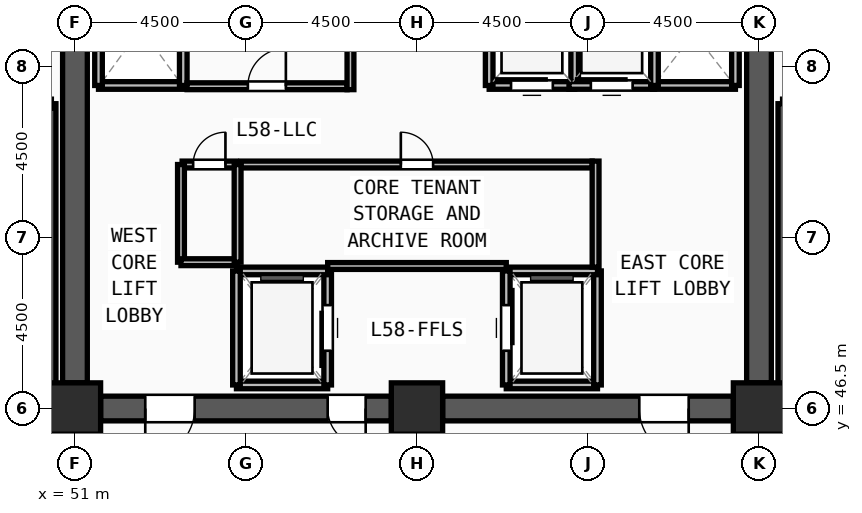
"""IFC4 building model, lengths in metres.
Left out: names, types, materials, properties, quantities, classifications, styles, units other than length and angle.
Written with IfcOpenShell. Run it as: python <this file> out.ifc"""

import sys

from ifc_helpers import new_model, si_unit, direction, frame, frame_2d, origin, origin_2d, place, context, subcontext, project, spatial, rectangle, extrude, source, transform, mapped, element, fill, save


model = new_model("IFC4")
c1 = context("Model", 3, precision=1e-05, world=origin(), true_north=direction((0.0, 1.0)))
c2 = subcontext(c1, "Body", "Model", "MODEL_VIEW")
j1 = project(units=[si_unit("LENGTHUNIT", "METRE"), si_unit("PLANEANGLEUNIT", "RADIAN")], contexts=[c1])
p1 = place(None, origin())
s1 = spatial("IfcSite", under=j1, at=p1, CompositionType="ELEMENT")
p2 = place(p1, origin())
s2 = spatial("IfcBuilding", under=s1, at=p2, CompositionType="ELEMENT")
p3 = place(p2, frame((0.0, 0.0, 224.25)))
s3 = spatial("IfcBuildingStorey", under=s2, at=p3, CompositionType="ELEMENT", Elevation=224.25)
m1 = source(origin(), c2, "Body", "SweptSolid", [
    extrude(rectangle(XDim=1.35, YDim=1.35, at=origin_2d()), origin(), (0.0, 0.0, 1.0), 3.75),
])
for number, where, z_axis, x_axis in (
    (1, (51.0, 46.5, 0.0), (0.0, 0.0, 1.0), (1.0, 0.0, 0.0)),
    (2, (60.0, 46.5, 0.0), (0.0, 0.0, 1.0), (1.0, 0.0, 0.0)),
    (3, (69.0, 46.5, 0.0), (0.0, 0.0, 1.0), (1.0, 0.0, 0.0)),
):
    element("IfcColumn", number, at=place(p3, frame(where, z_axis=z_axis, x_axis=x_axis)), inside=s3, PredefinedType="COLUMN", context=c2, shape_type="MappedRepresentation", body=[
        mapped(m1, transform((0.0, 0.0, 0.0), x_axis=(1.0, 0.0, 0.0), y_axis=(0.0, 1.0, 0.0), z_axis=(0.0, 0.0, 1.0), scale=1.0)),
    ])
p4 = place(p3, frame((69.0, 60.825, 0.0), z_axis=(0.0, 0.0, 1.0), x_axis=(0.0, -1.0, 0.0)))
e4 = element("IfcWall", 4, at=p4, inside=s3, PredefinedType="SHEAR", context=c2, shape_type="SweptSolid", body=[
    extrude(rectangle(XDim=13.65, YDim=0.65, at=frame_2d((6.825, 0.0))), origin(), (0.0, 0.0, 1.0), 3.57),
])
m2 = source(origin(), c2, "Body", "SweptSolid", [
    extrude(rectangle(XDim=1.2, YDim=2.2, at=frame_2d((0.6, 1.1))), frame((0.0, 0.335, 0.0), z_axis=(0.0, -1.0, 0.0), x_axis=(1.0, 0.0, 0.0)), (0.0, 0.0, 1.0), 0.67),
])
p5 = place(p4, frame((1.275, 0.0, 0.0)))
e5 = element("IfcOpeningElement", 5, at=p5, cuts=e4, PredefinedType="OPENING", context=c2, shape_type="MappedRepresentation", body=[
    mapped(m2, transform((0.0, 0.0, 0.0), x_axis=(1.0, 0.0, 0.0), y_axis=(0.0, 1.0, 0.0), z_axis=(0.0, 0.0, 1.0), scale=1.0)),
])
p6 = place(p3, frame((68.325, 46.5, 0.0), z_axis=(0.0, 0.0, 1.0), x_axis=(-1.0, 0.0, 0.0)))
e6 = element("IfcWall", 6, at=p6, inside=s3, PredefinedType="SHEAR", context=c2, shape_type="SweptSolid", body=[
    extrude(rectangle(XDim=7.65, YDim=0.65, at=frame_2d((3.825, 0.0))), origin(), (0.0, 0.0, 1.0), 3.57),
])
m3 = source(origin(), c2, "Body", "SweptSolid", [
    extrude(rectangle(XDim=1.3, YDim=2.2, at=frame_2d((0.65, 1.1))), frame((0.0, 0.335, 0.0), z_axis=(0.0, -1.0, 0.0), x_axis=(1.0, 0.0, 0.0)), (0.0, 0.0, 1.0), 0.67),
])
p7 = place(p6, frame((1.175, 0.0, 0.0)))
e7 = element("IfcOpeningElement", 7, at=p7, cuts=e6, PredefinedType="OPENING", context=c2, shape_type="MappedRepresentation", body=[
    mapped(m3, transform((0.0, 0.0, 0.0), x_axis=(1.0, 0.0, 0.0), y_axis=(0.0, 1.0, 0.0), z_axis=(0.0, 0.0, 1.0), scale=1.0)),
])
p8 = place(p3, frame((59.325, 46.5, 0.0), z_axis=(0.0, 0.0, 1.0), x_axis=(-1.0, 0.0, 0.0)))
e8 = element("IfcWall", 8, at=p8, inside=s3, PredefinedType="SHEAR", context=c2, shape_type="SweptSolid", body=[
    extrude(rectangle(XDim=7.65, YDim=0.65, at=frame_2d((3.825, 0.0))), origin(), (0.0, 0.0, 1.0), 3.57),
])
p9 = place(p8, frame((5.175, 0.0, 0.0)))
e9 = element("IfcOpeningElement", 9, at=p9, cuts=e8, PredefinedType="OPENING", context=c2, shape_type="MappedRepresentation", body=[
    mapped(m3, transform((0.0, 0.0, 0.0), x_axis=(1.0, 0.0, 0.0), y_axis=(0.0, 1.0, 0.0), z_axis=(0.0, 0.0, 1.0), scale=1.0)),
])
m4 = source(origin(), c2, "Body", "SweptSolid", [
    extrude(rectangle(XDim=1.0, YDim=2.2, at=frame_2d((0.5, 1.1))), frame((0.0, 0.335, 0.0), z_axis=(0.0, -1.0, 0.0), x_axis=(1.0, 0.0, 0.0)), (0.0, 0.0, 1.0), 0.67),
])
p10 = place(p8, frame((0.675, 0.0, 0.0)))
e10 = element("IfcOpeningElement", 10, at=p10, cuts=e8, PredefinedType="OPENING", context=c2, shape_type="MappedRepresentation", body=[
    mapped(m4, transform((0.0, 0.0, 0.0), x_axis=(1.0, 0.0, 0.0), y_axis=(0.0, 1.0, 0.0), z_axis=(0.0, 0.0, 1.0), scale=1.0)),
])
p11 = place(p3, frame((51.0, 47.175, 0.0), z_axis=(0.0, 0.0, 1.0), x_axis=(0.0, 1.0, 0.0)))
e11 = element("IfcWall", 11, at=p11, inside=s3, PredefinedType="SHEAR", context=c2, shape_type="SweptSolid", body=[
    extrude(rectangle(XDim=13.65, YDim=0.65, at=frame_2d((6.825, 0.0))), origin(), (0.0, 0.0, 1.0), 3.57),
])
for number, where, z_axis, x_axis in (
    (12, (50.38, 46.7, 0.0), (0.0, 0.0, 1.0), (0.0, 1.0, 0.0)),
    (13, (69.62, 54.52, 0.0), (0.0, 0.0, 1.0), (0.0, -1.0, 0.0)),
):
    element("IfcWall", number, at=place(p3, frame(where, z_axis=z_axis, x_axis=x_axis)), inside=s3, PredefinedType="SOLIDWALL", context=c2, shape_type="SweptSolid", body=[
        extrude(rectangle(XDim=7.82, YDim=0.24, at=frame_2d((3.91, 0.0))), origin(), (0.0, 0.0, 1.0), 3.57),
    ])
p12 = place(p3, frame((55.25, 47.12, 0.0), z_axis=(0.0, 0.0, 1.0), x_axis=(1.0, 0.0, 0.0)))
e14 = element("IfcWall", 14, at=p12, inside=s3, PredefinedType="SOLIDWALL", context=c2, shape_type="SweptSolid", body=[
    extrude(rectangle(XDim=2.4, YDim=0.2, at=frame_2d((1.2, 0.0))), origin(), (0.0, 0.0, 1.0), 3.57),
])
p13 = place(p3, frame((57.65, 47.12, 0.0), z_axis=(0.0, 0.0, 1.0), x_axis=(0.0, 1.0, 0.0)))
e15 = element("IfcWall", 15, at=p13, inside=s3, PredefinedType="SOLIDWALL", context=c2, shape_type="SweptSolid", body=[
    extrude(rectangle(XDim=3.0, YDim=0.2, at=frame_2d((1.5, 0.0))), origin(), (0.0, 0.0, 1.0), 3.57),
])
m5 = source(origin(), c2, "Body", "SweptSolid", [
    extrude(rectangle(XDim=1.2, YDim=2.3, at=frame_2d((0.6, 1.15))), frame((0.0, 0.11, 0.0), z_axis=(0.0, -1.0, 0.0), x_axis=(1.0, 0.0, 0.0)), (0.0, 0.0, 1.0), 0.22),
])
p14 = place(p13, frame((0.9, 0.0, 0.0)))
e16 = element("IfcOpeningElement", 16, at=p14, cuts=e15, PredefinedType="OPENING", context=c2, shape_type="MappedRepresentation", body=[
    mapped(m5, transform((0.0, 0.0, 0.0), x_axis=(1.0, 0.0, 0.0), y_axis=(0.0, 1.0, 0.0), z_axis=(0.0, 0.0, 1.0), scale=1.0)),
])
p15 = place(p3, frame((57.65, 50.12, 0.0), z_axis=(0.0, 0.0, 1.0), x_axis=(-1.0, 0.0, 0.0)))
e17 = element("IfcWall", 17, at=p15, inside=s3, PredefinedType="SOLIDWALL", context=c2, shape_type="SweptSolid", body=[
    extrude(rectangle(XDim=2.4, YDim=0.2, at=frame_2d((1.2, 0.0))), origin(), (0.0, 0.0, 1.0), 3.57),
])
p16 = place(p3, frame((55.25, 50.12, 0.0), z_axis=(0.0, 0.0, 1.0), x_axis=(0.0, -1.0, 0.0)))
e18 = element("IfcWall", 18, at=p16, inside=s3, PredefinedType="SOLIDWALL", context=c2, shape_type="SweptSolid", body=[
    extrude(rectangle(XDim=3.0, YDim=0.2, at=frame_2d((1.5, 0.0))), origin(), (0.0, 0.0, 1.0), 3.57),
])
p17 = place(p3, frame((62.35, 47.12, 0.0), z_axis=(0.0, 0.0, 1.0), x_axis=(1.0, 0.0, 0.0)))
e19 = element("IfcWall", 19, at=p17, inside=s3, PredefinedType="SOLIDWALL", context=c2, shape_type="SweptSolid", body=[
    extrude(rectangle(XDim=2.4, YDim=0.2, at=frame_2d((1.2, 0.0))), origin(), (0.0, 0.0, 1.0), 3.57),
])
p18 = place(p3, frame((64.75, 47.12, 0.0), z_axis=(0.0, 0.0, 1.0), x_axis=(0.0, 1.0, 0.0)))
e20 = element("IfcWall", 20, at=p18, inside=s3, PredefinedType="SOLIDWALL", context=c2, shape_type="SweptSolid", body=[
    extrude(rectangle(XDim=3.0, YDim=0.2, at=frame_2d((1.5, 0.0))), origin(), (0.0, 0.0, 1.0), 3.57),
])
p19 = place(p3, frame((64.75, 50.12, 0.0), z_axis=(0.0, 0.0, 1.0), x_axis=(-1.0, 0.0, 0.0)))
e21 = element("IfcWall", 21, at=p19, inside=s3, PredefinedType="SOLIDWALL", context=c2, shape_type="SweptSolid", body=[
    extrude(rectangle(XDim=2.4, YDim=0.2, at=frame_2d((1.2, 0.0))), origin(), (0.0, 0.0, 1.0), 3.57),
])
p20 = place(p3, frame((62.35, 50.12, 0.0), z_axis=(0.0, 0.0, 1.0), x_axis=(0.0, -1.0, 0.0)))
e22 = element("IfcWall", 22, at=p20, inside=s3, PredefinedType="SOLIDWALL", context=c2, shape_type="SweptSolid", body=[
    extrude(rectangle(XDim=3.0, YDim=0.2, at=frame_2d((1.5, 0.0))), origin(), (0.0, 0.0, 1.0), 3.57),
])
p21 = place(p20, frame((0.9, 0.0, 0.0)))
e23 = element("IfcOpeningElement", 23, at=p21, cuts=e22, PredefinedType="OPENING", context=c2, shape_type="MappedRepresentation", body=[
    mapped(m5, transform((0.0, 0.0, 0.0), x_axis=(1.0, 0.0, 0.0), y_axis=(0.0, 1.0, 0.0), z_axis=(0.0, 0.0, 1.0), scale=1.0)),
])
p22 = place(p3, frame((51.62, 55.0, 0.0), z_axis=(0.0, 0.0, 1.0), x_axis=(1.0, 0.0, 0.0)))
e24 = element("IfcWall", 24, at=p22, inside=s3, PredefinedType="SOLIDWALL", context=c2, shape_type="SweptSolid", body=[
    extrude(rectangle(XDim=2.23, YDim=0.2, at=frame_2d((1.115, 0.0))), origin(), (0.0, 0.0, 1.0), 3.57),
])
for number, where, z_axis, x_axis in (
    (25, (53.85, 55.0, 0.0), (0.0, 0.0, 1.0), (0.0, 1.0, 0.0)),
    (26, (51.62, 58.0, 0.0), (0.0, 0.0, 1.0), (0.0, -1.0, 0.0)),
):
    element("IfcWall", number, at=place(p3, frame(where, z_axis=z_axis, x_axis=x_axis)), inside=s3, PredefinedType="SOLIDWALL", context=c2, shape_type="SweptSolid", body=[
        extrude(rectangle(XDim=3.0, YDim=0.2, at=frame_2d((1.5, 0.0))), origin(), (0.0, 0.0, 1.0), 3.57),
    ])
p23 = place(p3, frame((66.2, 55.0, 0.0), z_axis=(0.0, 0.0, 1.0), x_axis=(1.0, 0.0, 0.0)))
e27 = element("IfcWall", 27, at=p23, inside=s3, PredefinedType="SOLIDWALL", context=c2, shape_type="SweptSolid", body=[
    extrude(rectangle(XDim=2.18, YDim=0.2, at=frame_2d((1.09, 0.0))), origin(), (0.0, 0.0, 1.0), 3.57),
])
p24 = place(p3, frame((68.38, 55.0, 0.0), z_axis=(0.0, 0.0, 1.0), x_axis=(0.0, 1.0, 0.0)))
e28 = element("IfcWall", 28, at=p24, inside=s3, PredefinedType="SOLIDWALL", context=c2, shape_type="SweptSolid", body=[
    extrude(rectangle(XDim=2.75, YDim=0.2, at=frame_2d((1.375, 0.0))), origin(), (0.0, 0.0, 1.0), 3.57),
])
p25 = place(p3, frame((61.9, 55.0, 0.0), z_axis=(0.0, 0.0, 1.0), x_axis=(1.0, 0.0, 0.0)))
e29 = element("IfcWall", 29, at=p25, inside=s3, PredefinedType="SOLIDWALL", context=c2, shape_type="SweptSolid", body=[
    extrude(rectangle(XDim=2.25, YDim=0.2, at=frame_2d((1.125, 0.0))), origin(), (0.0, 0.0, 1.0), 3.57),
])
m6 = source(origin(), c2, "Body", "SweptSolid", [
    extrude(rectangle(XDim=1.1, YDim=2.2, at=frame_2d((0.55, 1.1))), frame((0.0, 0.11, 0.0), z_axis=(0.0, -1.0, 0.0), x_axis=(1.0, 0.0, 0.0)), (0.0, 0.0, 1.0), 0.22),
])
p26 = place(p25, frame((0.575, 0.0, 0.0)))
e30 = element("IfcOpeningElement", 30, at=p26, cuts=e29, PredefinedType="OPENING", context=c2, shape_type="MappedRepresentation", body=[
    mapped(m6, transform((0.0, 0.0, 0.0), x_axis=(1.0, 0.0, 0.0), y_axis=(0.0, 1.0, 0.0), z_axis=(0.0, 0.0, 1.0), scale=1.0)),
])
for number, where, z_axis, x_axis in (
    (31, (64.15, 55.0, 0.0), (0.0, 0.0, 1.0), (0.0, 1.0, 0.0)),
    (32, (61.9, 57.6, 0.0), (0.0, 0.0, 1.0), (0.0, -1.0, 0.0)),
):
    element("IfcWall", number, at=place(p3, frame(where, z_axis=z_axis, x_axis=x_axis)), inside=s3, PredefinedType="SOLIDWALL", context=c2, shape_type="SweptSolid", body=[
        extrude(rectangle(XDim=2.6, YDim=0.2, at=frame_2d((1.3, 0.0))), origin(), (0.0, 0.0, 1.0), 3.57),
    ])
p27 = place(p3, frame((64.0, 55.0, 0.0), z_axis=(0.0, 0.0, 1.0), x_axis=(1.0, 0.0, 0.0)))
e33 = element("IfcWall", 33, at=p27, inside=s3, PredefinedType="SOLIDWALL", context=c2, shape_type="SweptSolid", body=[
    extrude(rectangle(XDim=2.25, YDim=0.2, at=frame_2d((1.125, 0.0))), origin(), (0.0, 0.0, 1.0), 3.57),
])
p28 = place(p27, frame((0.575, 0.0, 0.0)))
e34 = element("IfcOpeningElement", 34, at=p28, cuts=e33, PredefinedType="OPENING", context=c2, shape_type="MappedRepresentation", body=[
    mapped(m6, transform((0.0, 0.0, 0.0), x_axis=(1.0, 0.0, 0.0), y_axis=(0.0, 1.0, 0.0), z_axis=(0.0, 0.0, 1.0), scale=1.0)),
])
p29 = place(p3, frame((66.25, 55.0, 0.0), z_axis=(0.0, 0.0, 1.0), x_axis=(0.0, 1.0, 0.0)))
e35 = element("IfcWall", 35, at=p29, inside=s3, PredefinedType="SOLIDWALL", context=c2, shape_type="SweptSolid", body=[
    extrude(rectangle(XDim=2.6, YDim=0.2, at=frame_2d((1.3, 0.0))), origin(), (0.0, 0.0, 1.0), 3.57),
])
p30 = place(p3, frame((55.37, 52.92, 0.0), z_axis=(0.0, 0.0, 1.0), x_axis=(1.0, 0.0, 0.0)))
e36 = element("IfcWall", 36, at=p30, inside=s3, PredefinedType="PARTITIONING", context=c2, shape_type="SweptSolid", body=[
    extrude(rectangle(XDim=9.24, YDim=0.18, at=frame_2d((4.62, 0.0))), origin(), (0.0, 0.0, 1.0), 3.57),
])
m7 = source(origin(), c2, "Body", "SweptSolid", [
    extrude(rectangle(XDim=0.85, YDim=2.1, at=frame_2d((0.425, 1.05))), frame((0.0, 0.1, 0.0), z_axis=(0.0, -1.0, 0.0), x_axis=(1.0, 0.0, 0.0)), (0.0, 0.0, 1.0), 0.2),
])
p31 = place(p30, frame((4.205, 0.0, 0.0)))
e37 = element("IfcOpeningElement", 37, at=p31, cuts=e36, PredefinedType="OPENING", context=c2, shape_type="MappedRepresentation", body=[
    mapped(m7, transform((0.0, 0.0, 0.0), x_axis=(1.0, 0.0, 0.0), y_axis=(0.0, 1.0, 0.0), z_axis=(0.0, 0.0, 1.0), scale=1.0)),
])
p32 = place(p3, frame((53.95, 54.98, 0.0), z_axis=(0.0, 0.0, 1.0), x_axis=(1.0, 0.0, 0.0)))
e38 = element("IfcWall", 38, at=p32, inside=s3, PredefinedType="PARTITIONING", context=c2, shape_type="SweptSolid", body=[
    extrude(rectangle(XDim=4.21, YDim=0.18, at=frame_2d((2.105, 0.0))), origin(), (0.0, 0.0, 1.0), 3.57),
])
m8 = source(origin(), c2, "Body", "SweptSolid", [
    extrude(rectangle(XDim=1.0, YDim=2.2, at=frame_2d((0.5, 1.1))), frame((0.0, 0.1, 0.0), z_axis=(0.0, -1.0, 0.0), x_axis=(1.0, 0.0, 0.0)), (0.0, 0.0, 1.0), 0.2),
])
p33 = place(p32, frame((1.6, 0.0, 0.0)))
e39 = element("IfcOpeningElement", 39, at=p33, cuts=e38, PredefinedType="OPENING", context=c2, shape_type="MappedRepresentation", body=[
    mapped(m8, transform((0.0, 0.0, 0.0), x_axis=(1.0, 0.0, 0.0), y_axis=(0.0, 1.0, 0.0), z_axis=(0.0, 0.0, 1.0), scale=1.0)),
])
p34 = place(p3, frame((53.82, 52.92, 0.0), z_axis=(0.0, 0.0, 1.0), x_axis=(1.0, 0.0, 0.0)))
e40 = element("IfcWall", 40, at=p34, inside=s3, PredefinedType="PARTITIONING", context=c2, shape_type="SweptSolid", body=[
    extrude(rectangle(XDim=1.43, YDim=0.18, at=frame_2d((0.715, 0.0))), origin(), (0.0, 0.0, 1.0), 3.57),
])
p35 = place(p34, frame((0.29, 0.0, 0.0)))
e41 = element("IfcOpeningElement", 41, at=p35, cuts=e40, PredefinedType="OPENING", context=c2, shape_type="MappedRepresentation", body=[
    mapped(m7, transform((0.0, 0.0, 0.0), x_axis=(1.0, 0.0, 0.0), y_axis=(0.0, 1.0, 0.0), z_axis=(0.0, 0.0, 1.0), scale=1.0)),
])
p36 = place(p3, frame((53.79, 50.35, 0.0), z_axis=(0.0, 0.0, 1.0), x_axis=(0.0, 1.0, 0.0)))
e42 = element("IfcWall", 42, at=p36, inside=s3, PredefinedType="PARTITIONING", context=c2, shape_type="SweptSolid", body=[
    extrude(rectangle(XDim=2.57, YDim=0.18, at=frame_2d((1.285, 0.0))), origin(), (0.0, 0.0, 1.0), 3.57),
])
p37 = place(p3, frame((53.79, 50.35, 0.0), z_axis=(0.0, 0.0, 1.0), x_axis=(1.0, 0.0, 0.0)))
e43 = element("IfcWall", 43, at=p37, inside=s3, PredefinedType="PARTITIONING", context=c2, shape_type="SweptSolid", body=[
    extrude(rectangle(XDim=1.49, YDim=0.18, at=frame_2d((0.745, 0.0))), origin(), (0.0, 0.0, 1.0), 3.57),
])
p38 = place(p3, frame((55.28, 50.35, 0.0), z_axis=(0.0, 0.0, 1.0), x_axis=(0.0, 1.0, 0.0)))
e44 = element("IfcWall", 44, at=p38, inside=s3, PredefinedType="PARTITIONING", context=c2, shape_type="SweptSolid", body=[
    extrude(rectangle(XDim=2.57, YDim=0.18, at=frame_2d((1.285, 0.0))), origin(), (0.0, 0.0, 1.0), 3.57),
])
p39 = place(p3, frame((64.7, 50.22, 0.0), z_axis=(0.0, 0.0, 1.0), x_axis=(0.0, 1.0, 0.0)))
e45 = element("IfcWall", 45, at=p39, inside=s3, PredefinedType="PARTITIONING", context=c2, shape_type="SweptSolid", body=[
    extrude(rectangle(XDim=2.79, YDim=0.18, at=frame_2d((1.395, 0.0))), origin(), (0.0, 0.0, 1.0), 3.57),
])
p40 = place(p3, frame((57.65, 50.25, 0.0), z_axis=(0.0, 0.0, 1.0), x_axis=(1.0, 0.0, 0.0)))
e46 = element("IfcWall", 46, at=p40, inside=s3, PredefinedType="PARTITIONING", context=c2, shape_type="SweptSolid", body=[
    extrude(rectangle(XDim=4.7, YDim=0.18, at=frame_2d((2.35, 0.0))), origin(), (0.0, 0.0, 1.0), 3.57),
])
p41 = place(p3, frame((58.25, 54.89, 0.0), z_axis=(0.0, 0.0, 1.0), x_axis=(0.0, 1.0, 0.0)))
e47 = element("IfcWall", 47, at=p41, inside=s3, PredefinedType="PARTITIONING", context=c2, shape_type="SweptSolid", body=[
    extrude(rectangle(XDim=2.78, YDim=0.18, at=frame_2d((1.39, 0.0))), origin(), (0.0, 0.0, 1.0), 3.57),
])
m9 = source(origin(), c2, "Body", "SweptSolid", [
    extrude(rectangle(XDim=1.3, YDim=2.2, at=frame_2d((0.65, 1.1))), frame((0.0, 0.025, 0.0), z_axis=(0.0, -1.0, 0.0), x_axis=(1.0, 0.0, 0.0)), (0.0, 0.0, 1.0), 0.05),
])
p42 = place(p9, origin())
e48 = element("IfcDoor", 48, at=p42, inside=s3, OperationType="SINGLE_SWING_RIGHT", PredefinedType="DOOR", context=c2, shape_type="MappedRepresentation", body=[
    mapped(m9, transform((0.0, 0.0, 0.0), x_axis=(1.0, 0.0, 0.0), y_axis=(0.0, 1.0, 0.0), z_axis=(0.0, 0.0, 1.0), scale=1.0)),
])
fill(e9, e48)
m10 = source(origin(), c2, "Body", "SweptSolid", [
    extrude(rectangle(XDim=1.0, YDim=2.2, at=frame_2d((0.5, 1.1))), frame((0.0, 0.025, 0.0), z_axis=(0.0, -1.0, 0.0), x_axis=(1.0, 0.0, 0.0)), (0.0, 0.0, 1.0), 0.05),
])
p43 = place(p10, origin())
e49 = element("IfcDoor", 49, at=p43, inside=s3, OperationType="SINGLE_SWING_LEFT", PredefinedType="DOOR", context=c2, shape_type="MappedRepresentation", body=[
    mapped(m10, transform((0.0, 0.0, 0.0), x_axis=(1.0, 0.0, 0.0), y_axis=(0.0, 1.0, 0.0), z_axis=(0.0, 0.0, 1.0), scale=1.0)),
])
fill(e10, e49)
p44 = place(p7, origin())
e50 = element("IfcDoor", 50, at=p44, inside=s3, OperationType="SINGLE_SWING_LEFT", PredefinedType="DOOR", context=c2, shape_type="MappedRepresentation", body=[
    mapped(m9, transform((0.0, 0.0, 0.0), x_axis=(1.0, 0.0, 0.0), y_axis=(0.0, 1.0, 0.0), z_axis=(0.0, 0.0, 1.0), scale=1.0)),
])
fill(e7, e50)
m11 = source(origin(), c2, "Body", "SweptSolid", [
    extrude(rectangle(XDim=1.2, YDim=2.3, at=frame_2d((0.6, 1.15))), frame((0.0, 0.025, 0.0), z_axis=(0.0, -1.0, 0.0), x_axis=(1.0, 0.0, 0.0)), (0.0, 0.0, 1.0), 0.05),
])
p45 = place(p14, origin())
e51 = element("IfcDoor", 51, at=p45, inside=s3, OperationType="SLIDING_TO_LEFT", PredefinedType="DOOR", context=c2, shape_type="MappedRepresentation", body=[
    mapped(m11, transform((0.0, 0.0, 0.0), x_axis=(1.0, 0.0, 0.0), y_axis=(0.0, 1.0, 0.0), z_axis=(0.0, 0.0, 1.0), scale=1.0)),
])
fill(e16, e51)
p46 = place(p21, origin())
e52 = element("IfcDoor", 52, at=p46, inside=s3, OperationType="SLIDING_TO_LEFT", PredefinedType="DOOR", context=c2, shape_type="MappedRepresentation", body=[
    mapped(m11, transform((0.0, 0.0, 0.0), x_axis=(1.0, 0.0, 0.0), y_axis=(0.0, 1.0, 0.0), z_axis=(0.0, 0.0, 1.0), scale=1.0)),
])
fill(e23, e52)
m12 = source(origin(), c2, "Body", "SweptSolid", [
    extrude(rectangle(XDim=1.1, YDim=2.2, at=frame_2d((0.55, 1.1))), frame((0.0, 0.025, 0.0), z_axis=(0.0, -1.0, 0.0), x_axis=(1.0, 0.0, 0.0)), (0.0, 0.0, 1.0), 0.05),
])
p47 = place(p26, origin())
e53 = element("IfcDoor", 53, at=p47, inside=s3, OperationType="SLIDING_TO_LEFT", PredefinedType="DOOR", context=c2, shape_type="MappedRepresentation", body=[
    mapped(m12, transform((0.0, 0.0, 0.0), x_axis=(1.0, 0.0, 0.0), y_axis=(0.0, 1.0, 0.0), z_axis=(0.0, 0.0, 1.0), scale=1.0)),
])
fill(e30, e53)
p48 = place(p28, origin())
e54 = element("IfcDoor", 54, at=p48, inside=s3, OperationType="SLIDING_TO_LEFT", PredefinedType="DOOR", context=c2, shape_type="MappedRepresentation", body=[
    mapped(m12, transform((0.0, 0.0, 0.0), x_axis=(1.0, 0.0, 0.0), y_axis=(0.0, 1.0, 0.0), z_axis=(0.0, 0.0, 1.0), scale=1.0)),
])
fill(e34, e54)
m13 = source(origin(), c2, "Body", "SweptSolid", [
    extrude(rectangle(XDim=0.85, YDim=2.1, at=frame_2d((0.425, 1.05))), frame((0.0, 0.025, 0.0), z_axis=(0.0, -1.0, 0.0), x_axis=(1.0, 0.0, 0.0)), (0.0, 0.0, 1.0), 0.05),
])
p49 = place(p31, origin())
e55 = element("IfcDoor", 55, at=p49, inside=s3, OperationType="SINGLE_SWING_LEFT", PredefinedType="DOOR", context=c2, shape_type="MappedRepresentation", body=[
    mapped(m13, transform((0.0, 0.0, 0.0), x_axis=(1.0, 0.0, 0.0), y_axis=(0.0, 1.0, 0.0), z_axis=(0.0, 0.0, 1.0), scale=1.0)),
])
fill(e37, e55)
p50 = place(p33, origin())
e56 = element("IfcDoor", 56, at=p50, inside=s3, OperationType="SINGLE_SWING_RIGHT", PredefinedType="DOOR", context=c2, shape_type="MappedRepresentation", body=[
    mapped(m10, transform((0.0, 0.0, 0.0), x_axis=(1.0, 0.0, 0.0), y_axis=(0.0, 1.0, 0.0), z_axis=(0.0, 0.0, 1.0), scale=1.0)),
])
fill(e39, e56)
p51 = place(p35, origin())
e57 = element("IfcDoor", 57, at=p51, inside=s3, OperationType="SINGLE_SWING_RIGHT", PredefinedType="DOOR", context=c2, shape_type="MappedRepresentation", body=[
    mapped(m13, transform((0.0, 0.0, 0.0), x_axis=(1.0, 0.0, 0.0), y_axis=(0.0, 1.0, 0.0), z_axis=(0.0, 0.0, 1.0), scale=1.0)),
])
fill(e41, e57)
save(model, sys.argv[1])
